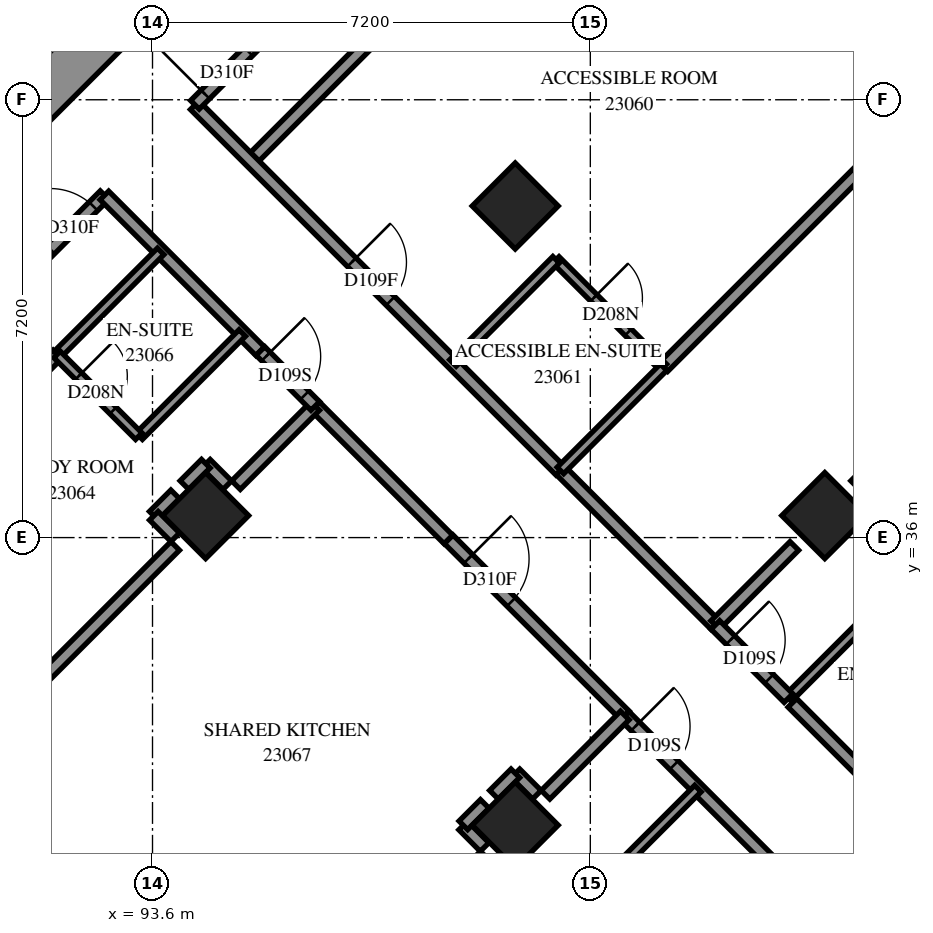
"""IFC4 building model, lengths in metres.
Left out: names, types, materials, properties, quantities, classifications, styles, units other than length and angle.
Written with IfcOpenShell. Run it as: python <this file> out.ifc"""

import sys

from ifc_helpers import new_model, si_unit, direction, frame, frame_2d, origin, origin_2d, place, context, subcontext, project, spatial, rectangle, extrude, element, fill, save


model = new_model("IFC4")
c1 = context("Model", 3, precision=1e-05, world=origin(), true_north=direction((0.0, 1.0)))
c2 = subcontext(c1, "Body", "Model", "MODEL_VIEW")
j1 = project(units=[si_unit("LENGTHUNIT", "METRE"), si_unit("PLANEANGLEUNIT", "RADIAN")], contexts=[c1])
p1 = place(None, origin())
s1 = spatial("IfcSite", under=j1, at=p1, CompositionType="ELEMENT")
p2 = place(p1, origin())
s2 = spatial("IfcBuilding", under=s1, at=p2, CompositionType="ELEMENT")
p3 = place(p2, frame((0.0, 0.0, 88.0)))
s3 = spatial("IfcBuildingStorey", under=s2, at=p3, CompositionType="ELEMENT", Elevation=88.0)
for number, where, z_axis, x_axis in (
    (1, (99.565, 41.453, 0.0), (0.0, 0.0, 1.0), (0.707, -0.707, 0.0)),
    (2, (94.474, 36.362, 0.0), (0.0, 0.0, 1.0), (0.707, -0.707, 0.0)),
    (3, (104.656, 36.362, 0.0), (0.0, 0.0, 1.0), (0.707, -0.707, 0.0)),
    (4, (99.565, 31.271, 0.0), (0.0, 0.0, 1.0), (0.707, -0.707, 0.0)),
):
    element("IfcColumn", number, at=place(p3, frame(where, z_axis=z_axis, x_axis=x_axis)), inside=s3, PredefinedType="COLUMN", context=c2, shape_type="SweptSolid", body=[
        extrude(rectangle(XDim=1.0, YDim=1.0, at=origin_2d()), origin(), (0.0, 0.0, 1.0), 3.1),
    ])
p4 = place(p3, frame((87.12, 38.625, -0.3), z_axis=(0.0, 0.0, 1.0), x_axis=(0.7071067812, 0.7071067812, 0.0)))
e5 = element("IfcWall", 5, at=p4, inside=s3, PredefinedType="SHEAR", context=c2, shape_type="SweptSolid", body=[
    extrude(rectangle(XDim=14.4, YDim=0.8, at=frame_2d((7.2, 0.0))), origin(), (0.0, 0.0, 1.0), 2.7),
])
p5 = place(p4, frame((4.55, 0.0, 0.3)))
e6 = element("IfcOpeningElement", 6, at=p5, cuts=e5, PredefinedType="OPENING", context=c2, shape_type="SweptSolid", body=[
    extrude(rectangle(XDim=1.1, YDim=2.1, at=frame_2d((0.55, 1.05))), frame((0.0, 0.41, 0.0), z_axis=(0.0, -1.0, 0.0), x_axis=(1.0, 0.0, 0.0)), (0.0, 0.0, 1.0), 0.82),
])
p6 = place(p4, frame((11.35, 0.0, 0.3)))
e7 = element("IfcOpeningElement", 7, at=p6, cuts=e5, PredefinedType="OPENING", context=c2, shape_type="SweptSolid", body=[
    extrude(rectangle(XDim=1.1, YDim=2.1, at=frame_2d((0.55, 1.05))), frame((0.0, 0.41, 0.0), z_axis=(0.0, -1.0, 0.0), x_axis=(1.0, 0.0, 0.0)), (0.0, 0.0, 1.0), 0.82),
])
p7 = place(p3, frame((95.215, 42.197, 0.0), z_axis=(0.0, 0.0, 1.0), x_axis=(0.7071067812, 0.7071067812, 0.0)))
e8 = element("IfcWall", 8, at=p7, inside=s3, PredefinedType="PARTITIONING", context=c2, shape_type="SweptSolid", body=[
    extrude(rectangle(XDim=10.675, YDim=0.2, at=frame_2d((5.338, 0.0))), origin(), (0.0, 0.0, 1.0), 3.1),
])
p8 = place(p3, frame((94.294, 43.111, 0.0), z_axis=(0.0, 0.0, 1.0), x_axis=(0.7071067812, -0.7071067812, 0.0)))
e9 = element("IfcWall", 9, at=p8, inside=s3, PredefinedType="PARTITIONING", context=c2, shape_type="SweptSolid", body=[
    extrude(rectangle(XDim=8.499, YDim=0.2, at=frame_2d((4.25, 0.0))), origin(), (0.0, 0.0, 1.0), 3.1),
])
p9 = place(p8, frame((3.651, 0.0, 0.0)))
e10 = element("IfcOpeningElement", 10, at=p9, cuts=e9, PredefinedType="OPENING", context=c2, shape_type="SweptSolid", body=[
    extrude(rectangle(XDim=0.9, YDim=2.1, at=frame_2d((0.45, 1.05))), frame((0.0, 0.11, 0.0), z_axis=(0.0, -1.0, 0.0), x_axis=(1.0, 0.0, 0.0)), (0.0, 0.0, 1.0), 0.22),
])
p10 = place(p3, frame((86.835, 35.655, 0.0), z_axis=(0.0, 0.0, 1.0), x_axis=(0.7071067812, 0.7071067812, 0.0)))
e11 = element("IfcWall", 11, at=p10, inside=s3, PredefinedType="PARTITIONING", context=c2, shape_type="SweptSolid", body=[
    extrude(rectangle(XDim=8.451, YDim=0.2, at=frame_2d((4.226, 0.0))), origin(), (0.0, 0.0, 1.0), 3.1),
])
p11 = place(p10, frame((7.192, 0.0, 0.0)))
e12 = element("IfcOpeningElement", 12, at=p11, cuts=e11, PredefinedType="OPENING", context=c2, shape_type="SweptSolid", body=[
    extrude(rectangle(XDim=1.0, YDim=2.1, at=frame_2d((0.5, 1.05))), frame((0.0, 0.11, 0.0), z_axis=(0.0, -1.0, 0.0), x_axis=(1.0, 0.0, 0.0)), (0.0, 0.0, 1.0), 0.22),
])
p12 = place(p3, frame((94.297, 43.117, 0.0), z_axis=(0.0, 0.0, 1.0), x_axis=(0.7071067812, 0.7071067812, 0.0)))
e13 = element("IfcWall", 13, at=p12, inside=s3, PredefinedType="PARTITIONING", context=c2, shape_type="SweptSolid", body=[
    extrude(rectangle(XDim=8.448, YDim=0.2, at=frame_2d((4.224, 0.0))), origin(), (0.0, 0.0, 1.0), 3.1),
])
p13 = place(p12, frame((0.242, 0.0, 0.0)))
e14 = element("IfcOpeningElement", 14, at=p13, cuts=e13, PredefinedType="OPENING", context=c2, shape_type="SweptSolid", body=[
    extrude(rectangle(XDim=1.0, YDim=2.1, at=frame_2d((0.5, 1.05))), frame((0.0, 0.11, 0.0), z_axis=(0.0, -1.0, 0.0), x_axis=(1.0, 0.0, 0.0)), (0.0, 0.0, 1.0), 0.22),
])
p14 = place(p3, frame((102.002, 38.804, 0.0), z_axis=(0.0, 0.0, 1.0), x_axis=(0.7072390372, 0.7069745004, 0.0)))
e15 = element("IfcWall", 15, at=p14, inside=s3, PredefinedType="PARTITIONING", context=c2, shape_type="SweptSolid", body=[
    extrude(rectangle(XDim=8.316, YDim=0.2, at=frame_2d((4.158, 0.0))), origin(), (0.0, 0.0, 1.0), 3.1),
])
p15 = place(p3, frame((86.347, 33.321, 0.0), z_axis=(0.0, 0.0, 1.0), x_axis=(0.706982505, 0.7072310356, 0.0)))
e16 = element("IfcWall", 16, at=p15, inside=s3, PredefinedType="PARTITIONING", context=c2, shape_type="SweptSolid", body=[
    extrude(rectangle(XDim=8.047, YDim=0.2, at=frame_2d((4.024, 0.0))), origin(), (0.0, 0.0, 1.0), 3.1),
])
p16 = place(p3, frame((101.365, 33.071, 0.0), z_axis=(0.0, 0.0, 1.0), x_axis=(0.7071067812, -0.7071067812, 0.0)))
e17 = element("IfcWall", 17, at=p16, inside=s3, PredefinedType="PARTITIONING", context=c2, shape_type="SweptSolid", body=[
    extrude(rectangle(XDim=7.2, YDim=0.2, at=frame_2d((3.6, 0.0))), origin(), (0.0, 0.0, 1.0), 3.1),
])
p17 = place(p16, frame((0.248, 0.0, 0.0)))
e18 = element("IfcOpeningElement", 18, at=p17, cuts=e17, PredefinedType="OPENING", context=c2, shape_type="SweptSolid", body=[
    extrude(rectangle(XDim=0.9, YDim=2.1, at=frame_2d((0.45, 1.05))), frame((0.0, 0.11, 0.0), z_axis=(0.0, -1.0, 0.0), x_axis=(1.0, 0.0, 0.0)), (0.0, 0.0, 1.0), 0.22),
])
p18 = place(p16, frame((5.95, 0.0, 0.0)))
e19 = element("IfcOpeningElement", 19, at=p18, cuts=e17, PredefinedType="OPENING", context=c2, shape_type="SweptSolid", body=[
    extrude(rectangle(XDim=0.9, YDim=2.1, at=frame_2d((0.45, 1.05))), frame((0.0, 0.11, 0.0), z_axis=(0.0, -1.0, 0.0), x_axis=(1.0, 0.0, 0.0)), (0.0, 0.0, 1.0), 0.22),
])
for number, where, z_axis, x_axis in (
    (20, (89.881, 31.771, 0.0), (0.0, 0.0, 1.0), (0.707, 0.707, 0.0)),
    (21, (105.155, 36.863, 0.0), (0.0, 0.0, 1.0), (0.707, 0.707, 0.0)),
):
    element("IfcWall", number, at=place(p3, frame(where, z_axis=z_axis, x_axis=x_axis)), inside=s3, PredefinedType="PARTITIONING", context=c2, shape_type="SweptSolid", body=[
        extrude(rectangle(XDim=5.787, YDim=0.2, at=frame_2d((2.893, 0.0))), origin(), (0.0, 0.0, 1.0), 3.1),
    ])
p19 = place(p3, frame((94.973, 26.681, 0.0), z_axis=(0.0, 0.0, 1.0), x_axis=(0.7071067812, 0.7071067812, 0.0)))
e22 = element("IfcWall", 22, at=p19, inside=s3, PredefinedType="PARTITIONING", context=c2, shape_type="SweptSolid", body=[
    extrude(rectangle(XDim=5.784, YDim=0.2, at=frame_2d((2.892, 0.0))), origin(), (0.0, 0.0, 1.0), 3.1),
])
p20 = place(p3, frame((104.123, 33.282, 0.0), z_axis=(0.0, 0.0, 1.0), x_axis=(0.7071067812, -0.7071067812, 0.0)))
e23 = element("IfcWall", 23, at=p20, inside=s3, PredefinedType="PARTITIONING", context=c2, shape_type="SweptSolid", body=[
    extrude(rectangle(XDim=5.399, YDim=0.2, at=frame_2d((2.7, 0.0))), origin(), (0.0, 0.0, 1.0), 3.1),
])
p21 = place(p20, frame((4.08, 0.0, 0.0)))
e24 = element("IfcOpeningElement", 24, at=p21, cuts=e23, PredefinedType="OPENING", context=c2, shape_type="SweptSolid", body=[
    extrude(rectangle(XDim=0.9, YDim=2.1, at=frame_2d((0.45, 1.05))), frame((0.0, 0.11, 0.0), z_axis=(0.0, -1.0, 0.0), x_axis=(1.0, 0.0, 0.0)), (0.0, 0.0, 1.0), 0.22),
])
p22 = place(p3, frame((98.469, 35.973, 0.0), z_axis=(0.0, 0.0, 1.0), x_axis=(0.7073506531, -0.7068628251, 0.0)))
e25 = element("IfcWall", 25, at=p22, inside=s3, PredefinedType="PARTITIONING", context=c2, shape_type="SweptSolid", body=[
    extrude(rectangle(XDim=4.1, YDim=0.2, at=frame_2d((2.05, 0.0))), origin(), (0.0, 0.0, 1.0), 3.1),
])
p23 = place(p22, frame((0.457, 0.0, 0.0)))
e26 = element("IfcOpeningElement", 26, at=p23, cuts=e25, PredefinedType="OPENING", context=c2, shape_type="SweptSolid", body=[
    extrude(rectangle(XDim=1.0, YDim=2.1, at=frame_2d((0.5, 1.05))), frame((0.0, 0.11, 0.0), z_axis=(0.0, -1.0, 0.0), x_axis=(1.0, 0.0, 0.0)), (0.0, 0.0, 1.0), 0.22),
])
p24 = place(p3, frame((92.809, 41.627, 0.0), z_axis=(0.0, 0.0, 1.0), x_axis=(0.7071067812, -0.7071067812, 0.0)))
e27 = element("IfcWall", 27, at=p24, inside=s3, PredefinedType="PARTITIONING", context=c2, shape_type="SweptSolid", body=[
    extrude(rectangle(XDim=3.623, YDim=0.2, at=frame_2d((1.812, 0.0))), origin(), (0.0, 0.0, 1.0), 3.1),
])
p25 = place(p3, frame((100.31, 37.106, 0.0), z_axis=(0.0, 0.0, 1.0), x_axis=(0.7073845681, -0.7068288851, 0.0)))
e28 = element("IfcWall", 28, at=p25, inside=s3, PredefinedType="PARTITIONING", context=c2, shape_type="SweptSolid", body=[
    extrude(rectangle(XDim=3.599, YDim=0.2, at=frame_2d((1.8, 0.0))), origin(), (0.0, 0.0, 1.0), 3.1),
])
p26 = place(p3, frame((96.274, 38.162, 0.0), z_axis=(0.0, 0.0, 1.0), x_axis=(0.7071067812, -0.7071067812, 0.0)))
e29 = element("IfcWall", 29, at=p26, inside=s3, PredefinedType="PARTITIONING", context=c2, shape_type="SweptSolid", body=[
    extrude(rectangle(XDim=3.1, YDim=0.2, at=frame_2d((1.55, 0.0))), origin(), (0.0, 0.0, 1.0), 3.1),
])
p27 = place(p3, frame((100.233, 40.567, 0.0), z_axis=(0.0, 0.0, 1.0), x_axis=(0.7071067812, -0.7071067812, 0.0)))
e30 = element("IfcWall", 30, at=p27, inside=s3, PredefinedType="PARTITIONING", context=c2, shape_type="SweptSolid", body=[
    extrude(rectangle(XDim=2.5, YDim=0.15, at=frame_2d((1.25, 0.0))), origin(), (0.0, 0.0, 1.0), 3.1),
])
p28 = place(p27, frame((0.883, 0.0, 0.0)))
e31 = element("IfcOpeningElement", 31, at=p28, cuts=e30, PredefinedType="OPENING", context=c2, shape_type="SweptSolid", body=[
    extrude(rectangle(XDim=0.8, YDim=2.1, at=frame_2d((0.4, 1.05))), frame((0.0, 0.085, 0.0), z_axis=(0.0, -1.0, 0.0), x_axis=(1.0, 0.0, 0.0)), (0.0, 0.0, 1.0), 0.17),
])
p29 = place(p3, frame((100.871, 30.175, 0.0), z_axis=(0.0, 0.0, 1.0), x_axis=(0.7071067812, 0.7071067812, 0.0)))
e32 = element("IfcWall", 32, at=p29, inside=s3, PredefinedType="PARTITIONING", context=c2, shape_type="SweptSolid", body=[
    extrude(rectangle(XDim=2.401, YDim=0.15, at=frame_2d((1.201, 0.0))), origin(), (0.0, 0.0, 1.0), 3.1),
])
for number, where, z_axis, x_axis in (
    (33, (92.037, 39.011, 0.0), (0.0, 0.0, 1.0), (0.708, 0.707, 0.0)),
    (34, (93.381, 37.667, 0.0), (0.0, 0.0, 1.0), (0.707, 0.708, 0.0)),
    (35, (98.541, 38.871, 0.0), (0.0, 0.0, 1.0), (0.707, 0.708, 0.0)),
    (36, (100.308, 37.103, 0.0), (0.0, 0.0, 1.0), (0.707, 0.708, 0.0)),
):
    element("IfcWall", number, at=place(p3, frame(where, z_axis=z_axis, x_axis=x_axis)), inside=s3, PredefinedType="PARTITIONING", context=c2, shape_type="SweptSolid", body=[
        extrude(rectangle(XDim=2.4, YDim=0.15, at=frame_2d((1.2, 0.0))), origin(), (0.0, 0.0, 1.0), 3.1),
    ])
p30 = place(p3, frame((104.055, 33.359, 0.0), z_axis=(0.0, 0.0, 1.0), x_axis=(0.7071067812, 0.7071067812, 0.0)))
e37 = element("IfcWall", 37, at=p30, inside=s3, PredefinedType="PARTITIONING", context=c2, shape_type="SweptSolid", body=[
    extrude(rectangle(XDim=2.398, YDim=0.15, at=frame_2d((1.199, 0.0))), origin(), (0.0, 0.0, 1.0), 3.1),
])
p31 = place(p3, frame((92.031, 39.011, 0.0), z_axis=(0.0, 0.0, 1.0), x_axis=(0.7071067812, -0.7071067812, 0.0)))
e38 = element("IfcWall", 38, at=p31, inside=s3, PredefinedType="PARTITIONING", context=c2, shape_type="SweptSolid", body=[
    extrude(rectangle(XDim=1.901, YDim=0.15, at=frame_2d((0.95, 0.0))), origin(), (0.0, 0.0, 1.0), 3.1),
])
p32 = place(p31, frame((0.502, 0.0, 0.0)))
e39 = element("IfcOpeningElement", 39, at=p32, cuts=e38, PredefinedType="OPENING", context=c2, shape_type="SweptSolid", body=[
    extrude(rectangle(XDim=0.8, YDim=2.1, at=frame_2d((0.4, 1.05))), frame((0.0, 0.085, 0.0), z_axis=(0.0, -1.0, 0.0), x_axis=(1.0, 0.0, 0.0)), (0.0, 0.0, 1.0), 0.17),
])
p33 = place(p3, frame((100.063, 31.771, 0.0), z_axis=(0.0, 0.0, 1.0), x_axis=(0.7071067812, 0.7071067812, 0.0)))
e40 = element("IfcWall", 40, at=p33, inside=s3, PredefinedType="PARTITIONING", context=c2, shape_type="SweptSolid", body=[
    extrude(rectangle(XDim=1.844, YDim=0.2, at=frame_2d((0.922, 0.0))), origin(), (0.0, 0.0, 1.0), 3.1),
])
for number, where, z_axis, x_axis in (
    (41, (94.973, 36.863, 0.0), (0.0, 0.0, 1.0), (0.707, 0.707, 0.0)),
    (42, (102.853, 34.561, 0.0), (0.0, 0.0, 1.0), (0.707, 0.707, 0.0)),
):
    element("IfcWall", number, at=place(p3, frame(where, z_axis=z_axis, x_axis=x_axis)), inside=s3, PredefinedType="PARTITIONING", context=c2, shape_type="SweptSolid", body=[
        extrude(rectangle(XDim=1.841, YDim=0.2, at=frame_2d((0.921, 0.0))), origin(), (0.0, 0.0, 1.0), 3.1),
    ])
p34 = place(p3, frame((102.857, 34.563, 0.0), z_axis=(0.0, 0.0, 1.0), x_axis=(0.7071067812, -0.7071067812, 0.0)))
e43 = element("IfcWall", 43, at=p34, inside=s3, PredefinedType="PARTITIONING", context=c2, shape_type="SweptSolid", body=[
    extrude(rectangle(XDim=1.7, YDim=0.2, at=frame_2d((0.85, 0.0))), origin(), (0.0, 0.0, 1.0), 3.1),
])
p35 = place(p34, frame((0.35, 0.0, 0.0)))
e44 = element("IfcOpeningElement", 44, at=p35, cuts=e43, PredefinedType="OPENING", context=c2, shape_type="SweptSolid", body=[
    extrude(rectangle(XDim=0.9, YDim=2.1, at=frame_2d((0.45, 1.05))), frame((0.0, 0.11, 0.0), z_axis=(0.0, -1.0, 0.0), x_axis=(1.0, 0.0, 0.0)), (0.0, 0.0, 1.0), 0.22),
])
p36 = place(p3, frame((95.375, 39.069, 0.0), z_axis=(0.0, 0.0, 1.0), x_axis=(0.7063232841, -0.7078894111, 0.0)))
e45 = element("IfcWall", 45, at=p36, inside=s3, PredefinedType="PARTITIONING", context=c2, shape_type="SweptSolid", body=[
    extrude(rectangle(XDim=1.277, YDim=0.2, at=frame_2d((0.638, 0.0))), origin(), (0.0, 0.0, 1.0), 3.1),
])
p37 = place(p36, frame((0.129, 0.0, 0.0)))
e46 = element("IfcOpeningElement", 46, at=p37, cuts=e45, PredefinedType="OPENING", context=c2, shape_type="SweptSolid", body=[
    extrude(rectangle(XDim=0.9, YDim=2.1, at=frame_2d((0.45, 1.05))), frame((0.0, 0.11, 0.0), z_axis=(0.0, -1.0, 0.0), x_axis=(1.0, 0.0, 0.0)), (0.0, 0.0, 1.0), 0.22),
])
p38 = place(p3, frame((98.709, 31.265, 0.0), z_axis=(0.0, 0.0, 1.0), x_axis=(0.7051008166, -0.7091070712, 0.0)))
e47 = element("IfcWall", 47, at=p38, inside=s3, PredefinedType="PARTITIONING", context=c2, shape_type="SweptSolid", body=[
    extrude(rectangle(XDim=0.499, YDim=0.2, at=frame_2d((0.25, 0.0))), origin(), (0.0, 0.0, 1.0), 3.1),
])
for number, where, z_axis, x_axis in (
    (48, (99.569, 32.123, 0.0), (0.0, 0.0, 1.0), (0.707, -0.707, 0.0)),
    (49, (93.621, 36.359, 0.0), (0.0, 0.0, 1.0), (0.707, 0.707, 0.0)),
    (50, (99.215, 31.771, 0.0), (0.0, 0.0, 1.0), (0.707, 0.707, 0.0)),
    (51, (94.478, 37.214, 0.0), (0.0, 0.0, 1.0), (0.707, -0.707, 0.0)),
    (52, (94.125, 36.863, 0.0), (0.0, 0.0, 1.0), (0.707, 0.707, 0.0)),
    (53, (98.712, 31.268, 0.0), (0.0, 0.0, 1.0), (0.707, 0.707, 0.0)),
    (54, (93.622, 36.358, 0.0), (0.0, 0.0, 1.0), (0.707, -0.707, 0.0)),
):
    element("IfcWall", number, at=place(p3, frame(where, z_axis=z_axis, x_axis=x_axis)), inside=s3, PredefinedType="PARTITIONING", context=c2, shape_type="SweptSolid", body=[
        extrude(rectangle(XDim=0.498, YDim=0.2, at=frame_2d((0.249, 0.0))), origin(), (0.0, 0.0, 1.0), 3.1),
    ])
p39 = place(p13, origin())
e55 = element("IfcDoor", 55, at=p39, inside=s3, OperationType="SINGLE_SWING_LEFT", PredefinedType="DOOR", context=c2, shape_type="SweptSolid", body=[
    extrude(rectangle(XDim=1.0, YDim=2.1, at=frame_2d((0.5, 1.05))), frame((0.0, 0.025, 0.0), z_axis=(0.0, -1.0, 0.0), x_axis=(1.0, 0.0, 0.0)), (0.0, 0.0, 1.0), 0.05),
])
fill(e14, e55)
p40 = place(p9, origin())
e56 = element("IfcDoor", 56, at=p40, inside=s3, OperationType="SINGLE_SWING_RIGHT", PredefinedType="DOOR", context=c2, shape_type="SweptSolid", body=[
    extrude(rectangle(XDim=0.9, YDim=2.1, at=frame_2d((0.45, 1.05))), frame((0.0, 0.025, 0.0), z_axis=(0.0, -1.0, 0.0), x_axis=(1.0, 0.0, 0.0)), (0.0, 0.0, 1.0), 0.05),
])
fill(e10, e56)
p41 = place(p28, origin())
e57 = element("IfcDoor", 57, at=p41, inside=s3, OperationType="SINGLE_SWING_RIGHT", PredefinedType="DOOR", context=c2, shape_type="SweptSolid", body=[
    extrude(rectangle(XDim=0.8, YDim=2.1, at=frame_2d((0.4, 1.05))), frame((0.0, 0.025, 0.0), z_axis=(0.0, -1.0, 0.0), x_axis=(1.0, 0.0, 0.0)), (0.0, 0.0, 1.0), 0.05),
])
fill(e31, e57)
p42 = place(p35, origin())
e58 = element("IfcDoor", 58, at=p42, inside=s3, OperationType="SINGLE_SWING_LEFT", PredefinedType="DOOR", context=c2, shape_type="SweptSolid", body=[
    extrude(rectangle(XDim=0.9, YDim=2.1, at=frame_2d((0.45, 1.05))), frame((0.0, 0.025, 0.0), z_axis=(0.0, -1.0, 0.0), x_axis=(1.0, 0.0, 0.0)), (0.0, 0.0, 1.0), 0.05),
])
fill(e44, e58)
p43 = place(p11, origin())
e59 = element("IfcDoor", 59, at=p43, inside=s3, OperationType="SINGLE_SWING_RIGHT", PredefinedType="DOOR", context=c2, shape_type="SweptSolid", body=[
    extrude(rectangle(XDim=1.0, YDim=2.1, at=frame_2d((0.5, 1.05))), frame((0.0, 0.025, 0.0), z_axis=(0.0, -1.0, 0.0), x_axis=(1.0, 0.0, 0.0)), (0.0, 0.0, 1.0), 0.05),
])
fill(e12, e59)
p44 = place(p37, origin())
e60 = element("IfcDoor", 60, at=p44, inside=s3, OperationType="SINGLE_SWING_LEFT", PredefinedType="DOOR", context=c2, shape_type="SweptSolid", body=[
    extrude(rectangle(XDim=0.9, YDim=2.1, at=frame_2d((0.45, 1.05))), frame((0.0, 0.025, 0.0), z_axis=(0.0, -1.0, 0.0), x_axis=(1.0, 0.0, 0.0)), (0.0, 0.0, 1.0), 0.05),
])
fill(e46, e60)
p45 = place(p32, origin())
e61 = element("IfcDoor", 61, at=p45, inside=s3, OperationType="SINGLE_SWING_RIGHT", PredefinedType="DOOR", context=c2, shape_type="SweptSolid", body=[
    extrude(rectangle(XDim=0.8, YDim=2.1, at=frame_2d((0.4, 1.05))), frame((0.0, 0.025, 0.0), z_axis=(0.0, -1.0, 0.0), x_axis=(1.0, 0.0, 0.0)), (0.0, 0.0, 1.0), 0.05),
])
fill(e39, e61)
p46 = place(p23, origin())
e62 = element("IfcDoor", 62, at=p46, inside=s3, OperationType="SINGLE_SWING_RIGHT", PredefinedType="DOOR", context=c2, shape_type="SweptSolid", body=[
    extrude(rectangle(XDim=1.0, YDim=2.1, at=frame_2d((0.5, 1.05))), frame((0.0, 0.025, 0.0), z_axis=(0.0, -1.0, 0.0), x_axis=(1.0, 0.0, 0.0)), (0.0, 0.0, 1.0), 0.05),
])
fill(e26, e62)
p47 = place(p17, origin())
e63 = element("IfcDoor", 63, at=p47, inside=s3, OperationType="SINGLE_SWING_RIGHT", PredefinedType="DOOR", context=c2, shape_type="SweptSolid", body=[
    extrude(rectangle(XDim=0.9, YDim=2.1, at=frame_2d((0.45, 1.05))), frame((0.0, 0.025, 0.0), z_axis=(0.0, -1.0, 0.0), x_axis=(1.0, 0.0, 0.0)), (0.0, 0.0, 1.0), 0.05),
])
fill(e18, e63)
save(model, sys.argv[1])
